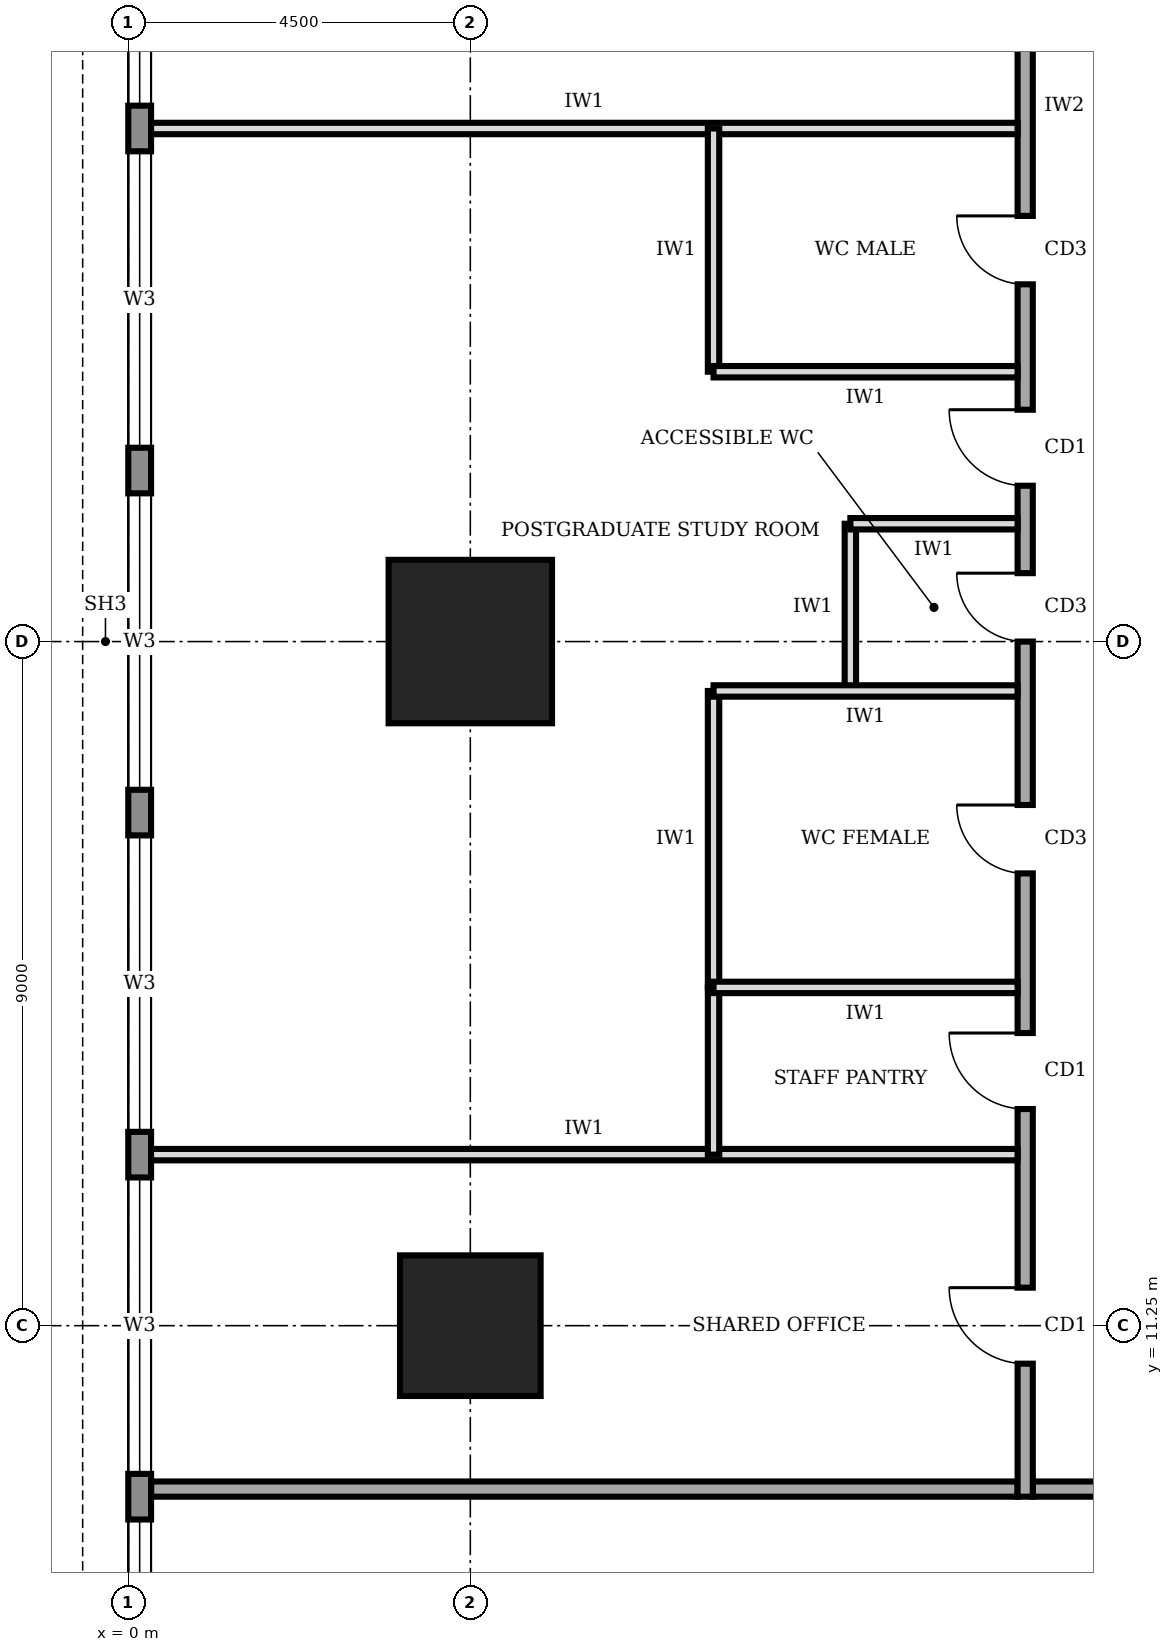
"""IFC4 building model, lengths in metres.
Left out: names, types, materials, properties, quantities, classifications, styles, units other than length and angle.
Written with IfcOpenShell. Run it as: python <this file> out.ifc"""

import sys

from ifc_helpers import new_model, si_unit, direction, frame, frame_2d, origin, origin_2d, place, context, subcontext, project, spatial, rectangle, extrude, element, fill, save


model = new_model("IFC4")
c1 = context("Model", 3, precision=1e-05, world=origin(), true_north=direction((0.0, 1.0)))
c2 = subcontext(c1, "Body", "Model", "MODEL_VIEW")
j1 = project(units=[si_unit("LENGTHUNIT", "METRE"), si_unit("PLANEANGLEUNIT", "RADIAN")], contexts=[c1])
p1 = place(None, origin())
s1 = spatial("IfcSite", under=j1, at=p1, CompositionType="ELEMENT")
p2 = place(p1, origin())
s2 = spatial("IfcBuilding", under=s1, at=p2, CompositionType="ELEMENT")
p3 = place(p2, frame((0.0, 0.0, 261.0)))
s3 = spatial("IfcBuildingStorey", under=s2, at=p3, CompositionType="ELEMENT", Elevation=261.0)
p4 = place(p3, frame((4.5, 11.25, 0.0), z_axis=(0.0, 0.0, 1.0), x_axis=(1.0, 0.0, 0.0)))
e1 = element("IfcColumn", 1, at=p4, inside=s3, PredefinedType="COLUMN", context=c2, shape_type="SweptSolid", body=[
    extrude(rectangle(XDim=1.85, YDim=1.85, at=origin_2d()), origin(), (0.0, 0.0, 1.0), 4.0),
])
p5 = place(p3, frame((4.5, 20.25, 0.0), z_axis=(0.0, 0.0, 1.0), x_axis=(1.0, 0.0, 0.0)))
e2 = element("IfcColumn", 2, at=p5, inside=s3, PredefinedType="COLUMN", context=c2, shape_type="SweptSolid", body=[
    extrude(rectangle(XDim=2.15, YDim=2.15, at=origin_2d()), origin(), (0.0, 0.0, 1.0), 4.0),
])
p6 = place(p3, frame((0.15, 35.98, 0.0), z_axis=(0.0, 0.0, 1.0), x_axis=(0.0, -1.0, 0.0)))
e3 = element("IfcWall", 3, at=p6, inside=s3, PredefinedType="STANDARD", context=c2, shape_type="SweptSolid", body=[
    extrude(rectangle(XDim=31.46, YDim=0.3, at=frame_2d((15.73, 0.0))), origin(), (0.0, 0.0, 1.0), 3.75),
])
p7 = place(p6, frame((27.28, 0.0, 0.95)))
e4 = element("IfcOpeningElement", 4, at=p7, cuts=e3, PredefinedType="OPENING", context=c2, shape_type="SweptSolid", body=[
    extrude(rectangle(XDim=3.9, YDim=1.8, at=frame_2d((1.95, 0.9))), frame((0.0, 0.16, 0.0), z_axis=(0.0, -1.0, 0.0), x_axis=(1.0, 0.0, 0.0)), (0.0, 0.0, 1.0), 0.32),
])
p8 = place(p6, frame((22.78, 0.0, 0.95)))
e5 = element("IfcOpeningElement", 5, at=p8, cuts=e3, PredefinedType="OPENING", context=c2, shape_type="SweptSolid", body=[
    extrude(rectangle(XDim=3.9, YDim=1.8, at=frame_2d((1.95, 0.9))), frame((0.0, 0.16, 0.0), z_axis=(0.0, -1.0, 0.0), x_axis=(1.0, 0.0, 0.0)), (0.0, 0.0, 1.0), 0.32),
])
p9 = place(p6, frame((18.28, 0.0, 0.95)))
e6 = element("IfcOpeningElement", 6, at=p9, cuts=e3, PredefinedType="OPENING", context=c2, shape_type="SweptSolid", body=[
    extrude(rectangle(XDim=3.9, YDim=1.8, at=frame_2d((1.95, 0.9))), frame((0.0, 0.16, 0.0), z_axis=(0.0, -1.0, 0.0), x_axis=(1.0, 0.0, 0.0)), (0.0, 0.0, 1.0), 0.32),
])
p10 = place(p6, frame((13.78, 0.0, 0.95)))
e7 = element("IfcOpeningElement", 7, at=p10, cuts=e3, PredefinedType="OPENING", context=c2, shape_type="SweptSolid", body=[
    extrude(rectangle(XDim=3.9, YDim=1.8, at=frame_2d((1.95, 0.9))), frame((0.0, 0.16, 0.0), z_axis=(0.0, -1.0, 0.0), x_axis=(1.0, 0.0, 0.0)), (0.0, 0.0, 1.0), 0.32),
])
p11 = place(p6, frame((9.28, 0.0, 0.95)))
e8 = element("IfcOpeningElement", 8, at=p11, cuts=e3, PredefinedType="OPENING", context=c2, shape_type="SweptSolid", body=[
    extrude(rectangle(XDim=3.9, YDim=1.8, at=frame_2d((1.95, 0.9))), frame((0.0, 0.16, 0.0), z_axis=(0.0, -1.0, 0.0), x_axis=(1.0, 0.0, 0.0)), (0.0, 0.0, 1.0), 0.32),
])
p12 = place(p6, frame((4.78, 0.0, 0.95)))
e9 = element("IfcOpeningElement", 9, at=p12, cuts=e3, PredefinedType="OPENING", context=c2, shape_type="SweptSolid", body=[
    extrude(rectangle(XDim=3.9, YDim=1.8, at=frame_2d((1.95, 0.9))), frame((0.0, 0.16, 0.0), z_axis=(0.0, -1.0, 0.0), x_axis=(1.0, 0.0, 0.0)), (0.0, 0.0, 1.0), 0.32),
])
p13 = place(p3, frame((11.9, 9.1, 0.0), z_axis=(0.0, 0.0, 1.0), x_axis=(1.0, 0.0, 0.0)))
e10 = element("IfcWall", 10, at=p13, inside=s3, PredefinedType="SOLIDWALL", context=c2, shape_type="SweptSolid", body=[
    extrude(rectangle(XDim=16.9, YDim=0.2, at=frame_2d((8.45, 0.0))), origin(), (0.0, 0.0, 1.0), 3.75),
])
p14 = place(p13, frame((2.25, 0.0, 0.0)))
e11 = element("IfcOpeningElement", 11, at=p14, cuts=e10, PredefinedType="OPENING", context=c2, shape_type="SweptSolid", body=[
    extrude(rectangle(XDim=1.4, YDim=2.1, at=frame_2d((0.7, 1.05))), frame((0.0, 0.11, 0.0), z_axis=(0.0, -1.0, 0.0), x_axis=(1.0, 0.0, 0.0)), (0.0, 0.0, 1.0), 0.22),
])
p15 = place(p13, frame((10.8, 0.0, 0.0)))
e12 = element("IfcOpeningElement", 12, at=p15, cuts=e10, PredefinedType="OPENING", context=c2, shape_type="SweptSolid", body=[
    extrude(rectangle(XDim=1.4, YDim=2.1, at=frame_2d((0.7, 1.05))), frame((0.0, 0.11, 0.0), z_axis=(0.0, -1.0, 0.0), x_axis=(1.0, 0.0, 0.0)), (0.0, 0.0, 1.0), 0.22),
])
p16 = place(p3, frame((11.8, 31.3, 0.0), z_axis=(0.0, 0.0, 1.0), x_axis=(0.0, -1.0, 0.0)))
e13 = element("IfcWall", 13, at=p16, inside=s3, PredefinedType="SOLIDWALL", context=c2, shape_type="SweptSolid", body=[
    extrude(rectangle(XDim=22.3, YDim=0.2, at=frame_2d((11.15, 0.0))), origin(), (0.0, 0.0, 1.0), 3.75),
])
p17 = place(p16, frame((19.55, 0.0, 0.0)))
e14 = element("IfcOpeningElement", 14, at=p17, cuts=e13, PredefinedType="OPENING", context=c2, shape_type="SweptSolid", body=[
    extrude(rectangle(XDim=1.0, YDim=2.1, at=frame_2d((0.5, 1.05))), frame((0.0, 0.11, 0.0), z_axis=(0.0, -1.0, 0.0), x_axis=(1.0, 0.0, 0.0)), (0.0, 0.0, 1.0), 0.22),
])
p18 = place(p16, frame((16.2, 0.0, 0.0)))
e15 = element("IfcOpeningElement", 15, at=p18, cuts=e13, PredefinedType="OPENING", context=c2, shape_type="SweptSolid", body=[
    extrude(rectangle(XDim=1.0, YDim=2.1, at=frame_2d((0.5, 1.05))), frame((0.0, 0.11, 0.0), z_axis=(0.0, -1.0, 0.0), x_axis=(1.0, 0.0, 0.0)), (0.0, 0.0, 1.0), 0.22),
])
p19 = place(p16, frame((13.2, 0.0, 0.0)))
e16 = element("IfcOpeningElement", 16, at=p19, cuts=e13, PredefinedType="OPENING", context=c2, shape_type="SweptSolid", body=[
    extrude(rectangle(XDim=0.9, YDim=2.1, at=frame_2d((0.45, 1.05))), frame((0.0, 0.11, 0.0), z_axis=(0.0, -1.0, 0.0), x_axis=(1.0, 0.0, 0.0)), (0.0, 0.0, 1.0), 0.22),
])
p20 = place(p16, frame((10.15, 0.0, 0.0)))
e17 = element("IfcOpeningElement", 17, at=p20, cuts=e13, PredefinedType="OPENING", context=c2, shape_type="SweptSolid", body=[
    extrude(rectangle(XDim=0.9, YDim=2.1, at=frame_2d((0.45, 1.05))), frame((0.0, 0.11, 0.0), z_axis=(0.0, -1.0, 0.0), x_axis=(1.0, 0.0, 0.0)), (0.0, 0.0, 1.0), 0.22),
])
p21 = place(p16, frame((5.45, 0.0, 0.0)))
e18 = element("IfcOpeningElement", 18, at=p21, cuts=e13, PredefinedType="OPENING", context=c2, shape_type="SweptSolid", body=[
    extrude(rectangle(XDim=0.9, YDim=2.1, at=frame_2d((0.45, 1.05))), frame((0.0, 0.11, 0.0), z_axis=(0.0, -1.0, 0.0), x_axis=(1.0, 0.0, 0.0)), (0.0, 0.0, 1.0), 0.22),
])
p22 = place(p16, frame((8.0, 0.0, 0.0)))
e19 = element("IfcOpeningElement", 19, at=p22, cuts=e13, PredefinedType="OPENING", context=c2, shape_type="SweptSolid", body=[
    extrude(rectangle(XDim=1.0, YDim=2.1, at=frame_2d((0.5, 1.05))), frame((0.0, 0.11, 0.0), z_axis=(0.0, -1.0, 0.0), x_axis=(1.0, 0.0, 0.0)), (0.0, 0.0, 1.0), 0.22),
])
p23 = place(p16, frame((1.55, 0.0, 0.0)))
e20 = element("IfcOpeningElement", 20, at=p23, cuts=e13, PredefinedType="OPENING", context=c2, shape_type="SweptSolid", body=[
    extrude(rectangle(XDim=1.0, YDim=2.1, at=frame_2d((0.5, 1.05))), frame((0.0, 0.11, 0.0), z_axis=(0.0, -1.0, 0.0), x_axis=(1.0, 0.0, 0.0)), (0.0, 0.0, 1.0), 0.22),
])
p24 = place(p3, frame((0.3, 9.1, 0.0), z_axis=(0.0, 0.0, 1.0), x_axis=(1.0, 0.0, 0.0)))
e21 = element("IfcWall", 21, at=p24, inside=s3, PredefinedType="SOLIDWALL", context=c2, shape_type="SweptSolid", body=[
    extrude(rectangle(XDim=11.4, YDim=0.2, at=frame_2d((5.7, 0.0))), origin(), (0.0, 0.0, 1.0), 3.75),
])
for number, where, z_axis, x_axis in (
    (22, (0.3, 13.5, 0.0), (0.0, 0.0, 1.0), (1.0, 0.0, 0.0)),
    (23, (0.3, 27.0, 0.0), (0.0, 0.0, 1.0), (1.0, 0.0, 0.0)),
):
    element("IfcWall", number, at=place(p3, frame(where, z_axis=z_axis, x_axis=x_axis)), inside=s3, PredefinedType="PARTITIONING", context=c2, shape_type="SweptSolid", body=[
        extrude(rectangle(XDim=11.4, YDim=0.15, at=frame_2d((5.7, 0.0))), origin(), (0.0, 0.0, 1.0), 3.75),
    ])
p25 = place(p3, frame((11.7, 15.7, 0.0), z_axis=(0.0, 0.0, 1.0), x_axis=(-1.0, 0.0, 0.0)))
e24 = element("IfcWall", 24, at=p25, inside=s3, PredefinedType="PARTITIONING", context=c2, shape_type="SweptSolid", body=[
    extrude(rectangle(XDim=4.0, YDim=0.15, at=frame_2d((2.0, 0.0))), origin(), (0.0, 0.0, 1.0), 3.75),
])
p26 = place(p3, frame((11.7, 19.6, 0.0), z_axis=(0.0, 0.0, 1.0), x_axis=(-1.0, 0.0, 0.0)))
e25 = element("IfcWall", 25, at=p26, inside=s3, PredefinedType="PARTITIONING", context=c2, shape_type="SweptSolid", body=[
    extrude(rectangle(XDim=4.0, YDim=0.15, at=frame_2d((2.0, 0.0))), origin(), (0.0, 0.0, 1.0), 2.85),
])
p27 = place(p3, frame((11.7, 21.8, 0.0), z_axis=(0.0, 0.0, 1.0), x_axis=(-1.0, 0.0, 0.0)))
e26 = element("IfcWall", 26, at=p27, inside=s3, PredefinedType="PARTITIONING", context=c2, shape_type="SweptSolid", body=[
    extrude(rectangle(XDim=2.2, YDim=0.15, at=frame_2d((1.1, 0.0))), origin(), (0.0, 0.0, 1.0), 3.75),
])
p28 = place(p3, frame((11.7, 23.8, 0.0), z_axis=(0.0, 0.0, 1.0), x_axis=(-1.0, 0.0, 0.0)))
e27 = element("IfcWall", 27, at=p28, inside=s3, PredefinedType="PARTITIONING", context=c2, shape_type="SweptSolid", body=[
    extrude(rectangle(XDim=4.0, YDim=0.15, at=frame_2d((2.0, 0.0))), origin(), (0.0, 0.0, 1.0), 3.75),
])
p29 = place(p3, frame((7.7, 13.5, 0.0), z_axis=(0.0, 0.0, 1.0), x_axis=(0.0, 1.0, 0.0)))
e28 = element("IfcWall", 28, at=p29, inside=s3, PredefinedType="PARTITIONING", context=c2, shape_type="SweptSolid", body=[
    extrude(rectangle(XDim=2.2, YDim=0.15, at=frame_2d((1.1, 0.0))), origin(), (0.0, 0.0, 1.0), 3.75),
])
p30 = place(p3, frame((7.7, 15.7, 0.0), z_axis=(0.0, 0.0, 1.0), x_axis=(0.0, 1.0, 0.0)))
e29 = element("IfcWall", 29, at=p30, inside=s3, PredefinedType="PARTITIONING", context=c2, shape_type="SweptSolid", body=[
    extrude(rectangle(XDim=3.9, YDim=0.15, at=frame_2d((1.95, 0.0))), origin(), (0.0, 0.0, 1.0), 3.75),
])
p31 = place(p3, frame((9.5, 19.6, 0.0), z_axis=(0.0, 0.0, 1.0), x_axis=(0.0, 1.0, 0.0)))
e30 = element("IfcWall", 30, at=p31, inside=s3, PredefinedType="PARTITIONING", context=c2, shape_type="SweptSolid", body=[
    extrude(rectangle(XDim=2.2, YDim=0.15, at=frame_2d((1.1, 0.0))), origin(), (0.0, 0.0, 1.0), 3.75),
])
p32 = place(p3, frame((7.7, 23.8, 0.0), z_axis=(0.0, 0.0, 1.0), x_axis=(0.0, 1.0, 0.0)))
e31 = element("IfcWall", 31, at=p32, inside=s3, PredefinedType="PARTITIONING", context=c2, shape_type="SweptSolid", body=[
    extrude(rectangle(XDim=3.2, YDim=0.15, at=frame_2d((1.6, 0.0))), origin(), (0.0, 0.0, 1.0), 3.75),
])
p33 = place(p7, origin())
e32 = element("IfcWindow", 32, at=p33, inside=s3, PartitioningType="SINGLE_PANEL", PredefinedType="WINDOW", context=c2, shape_type="SweptSolid", body=[
    extrude(rectangle(XDim=3.9, YDim=1.8, at=frame_2d((1.95, 0.9))), frame((0.0, 0.03, 0.0), z_axis=(0.0, -1.0, 0.0), x_axis=(1.0, 0.0, 0.0)), (0.0, 0.0, 1.0), 0.06),
])
fill(e4, e32)
p34 = place(p8, origin())
e33 = element("IfcWindow", 33, at=p34, inside=s3, PartitioningType="SINGLE_PANEL", PredefinedType="WINDOW", context=c2, shape_type="SweptSolid", body=[
    extrude(rectangle(XDim=3.9, YDim=1.8, at=frame_2d((1.95, 0.9))), frame((0.0, 0.03, 0.0), z_axis=(0.0, -1.0, 0.0), x_axis=(1.0, 0.0, 0.0)), (0.0, 0.0, 1.0), 0.06),
])
fill(e5, e33)
p35 = place(p9, origin())
e34 = element("IfcWindow", 34, at=p35, inside=s3, PartitioningType="SINGLE_PANEL", PredefinedType="WINDOW", context=c2, shape_type="SweptSolid", body=[
    extrude(rectangle(XDim=3.9, YDim=1.8, at=frame_2d((1.95, 0.9))), frame((0.0, 0.03, 0.0), z_axis=(0.0, -1.0, 0.0), x_axis=(1.0, 0.0, 0.0)), (0.0, 0.0, 1.0), 0.06),
])
fill(e6, e34)
p36 = place(p10, origin())
e35 = element("IfcWindow", 35, at=p36, inside=s3, PartitioningType="SINGLE_PANEL", PredefinedType="WINDOW", context=c2, shape_type="SweptSolid", body=[
    extrude(rectangle(XDim=3.9, YDim=1.8, at=frame_2d((1.95, 0.9))), frame((0.0, 0.03, 0.0), z_axis=(0.0, -1.0, 0.0), x_axis=(1.0, 0.0, 0.0)), (0.0, 0.0, 1.0), 0.06),
])
fill(e7, e35)
p37 = place(p11, origin())
e36 = element("IfcWindow", 36, at=p37, inside=s3, PartitioningType="SINGLE_PANEL", PredefinedType="WINDOW", context=c2, shape_type="SweptSolid", body=[
    extrude(rectangle(XDim=3.9, YDim=1.8, at=frame_2d((1.95, 0.9))), frame((0.0, 0.03, 0.0), z_axis=(0.0, -1.0, 0.0), x_axis=(1.0, 0.0, 0.0)), (0.0, 0.0, 1.0), 0.06),
])
fill(e8, e36)
p38 = place(p12, origin())
e37 = element("IfcWindow", 37, at=p38, inside=s3, PartitioningType="SINGLE_PANEL", PredefinedType="WINDOW", context=c2, shape_type="SweptSolid", body=[
    extrude(rectangle(XDim=3.9, YDim=1.8, at=frame_2d((1.95, 0.9))), frame((0.0, 0.03, 0.0), z_axis=(0.0, -1.0, 0.0), x_axis=(1.0, 0.0, 0.0)), (0.0, 0.0, 1.0), 0.06),
])
fill(e9, e37)
p39 = place(p17, frame((1.0, 0.0, 0.0), z_axis=(0.0, 0.0, 1.0), x_axis=(-1.0, 0.0, 0.0)))
e38 = element("IfcDoor", 38, at=p39, inside=s3, OperationType="SINGLE_SWING_RIGHT", PredefinedType="DOOR", context=c2, shape_type="SweptSolid", body=[
    extrude(rectangle(XDim=1.0, YDim=2.1, at=frame_2d((0.5, 1.05))), frame((0.0, 0.025, 0.0), z_axis=(0.0, -1.0, 0.0), x_axis=(1.0, 0.0, 0.0)), (0.0, 0.0, 1.0), 0.05),
])
fill(e14, e38)
p40 = place(p18, frame((1.0, 0.0, 0.0), z_axis=(0.0, 0.0, 1.0), x_axis=(-1.0, 0.0, 0.0)))
e39 = element("IfcDoor", 39, at=p40, inside=s3, OperationType="SINGLE_SWING_RIGHT", PredefinedType="DOOR", context=c2, shape_type="SweptSolid", body=[
    extrude(rectangle(XDim=1.0, YDim=2.1, at=frame_2d((0.5, 1.05))), frame((0.0, 0.025, 0.0), z_axis=(0.0, -1.0, 0.0), x_axis=(1.0, 0.0, 0.0)), (0.0, 0.0, 1.0), 0.05),
])
fill(e15, e39)
p41 = place(p19, frame((0.9, 0.0, 0.0), z_axis=(0.0, 0.0, 1.0), x_axis=(-1.0, 0.0, 0.0)))
e40 = element("IfcDoor", 40, at=p41, inside=s3, OperationType="SINGLE_SWING_RIGHT", PredefinedType="DOOR", context=c2, shape_type="SweptSolid", body=[
    extrude(rectangle(XDim=0.9, YDim=2.1, at=frame_2d((0.45, 1.05))), frame((0.0, 0.025, 0.0), z_axis=(0.0, -1.0, 0.0), x_axis=(1.0, 0.0, 0.0)), (0.0, 0.0, 1.0), 0.05),
])
fill(e16, e40)
p42 = place(p20, frame((0.9, 0.0, 0.0), z_axis=(0.0, 0.0, 1.0), x_axis=(-1.0, 0.0, 0.0)))
e41 = element("IfcDoor", 41, at=p42, inside=s3, OperationType="SINGLE_SWING_RIGHT", PredefinedType="DOOR", context=c2, shape_type="SweptSolid", body=[
    extrude(rectangle(XDim=0.9, YDim=2.1, at=frame_2d((0.45, 1.05))), frame((0.0, 0.025, 0.0), z_axis=(0.0, -1.0, 0.0), x_axis=(1.0, 0.0, 0.0)), (0.0, 0.0, 1.0), 0.05),
])
fill(e17, e41)
p43 = place(p21, frame((0.9, 0.0, 0.0), z_axis=(0.0, 0.0, 1.0), x_axis=(-1.0, 0.0, 0.0)))
e42 = element("IfcDoor", 42, at=p43, inside=s3, OperationType="SINGLE_SWING_RIGHT", PredefinedType="DOOR", context=c2, shape_type="SweptSolid", body=[
    extrude(rectangle(XDim=0.9, YDim=2.1, at=frame_2d((0.45, 1.05))), frame((0.0, 0.025, 0.0), z_axis=(0.0, -1.0, 0.0), x_axis=(1.0, 0.0, 0.0)), (0.0, 0.0, 1.0), 0.05),
])
fill(e18, e42)
p44 = place(p22, frame((1.0, 0.0, 0.0), z_axis=(0.0, 0.0, 1.0), x_axis=(-1.0, 0.0, 0.0)))
e43 = element("IfcDoor", 43, at=p44, inside=s3, OperationType="SINGLE_SWING_RIGHT", PredefinedType="DOOR", context=c2, shape_type="SweptSolid", body=[
    extrude(rectangle(XDim=1.0, YDim=2.1, at=frame_2d((0.5, 1.05))), frame((0.0, 0.025, 0.0), z_axis=(0.0, -1.0, 0.0), x_axis=(1.0, 0.0, 0.0)), (0.0, 0.0, 1.0), 0.05),
])
fill(e19, e43)
save(model, sys.argv[1])
